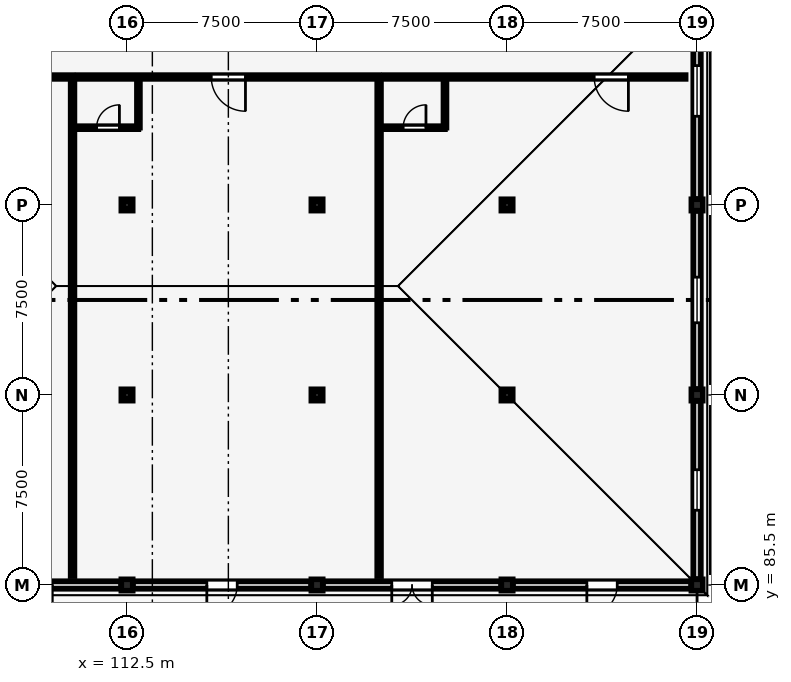
"""IFC4 building model, lengths in metres.
Left out: names, types, materials, properties, quantities, classifications, styles, units other than length and angle.
Written with IfcOpenShell. Run it as: python <this file> out.ifc"""

import sys

from ifc_helpers import new_model, si_unit, direction, frame, frame_2d, origin, origin_2d, place, context, subcontext, project, spatial, rectangle, i_section, extrude, element, fill, save


model = new_model("IFC4")
c1 = context("Model", 3, precision=1e-05, world=origin(), true_north=direction((0.0, 1.0)))
c2 = subcontext(c1, "Body", "Model", "MODEL_VIEW")
j1 = project(units=[si_unit("LENGTHUNIT", "METRE"), si_unit("PLANEANGLEUNIT", "RADIAN")], contexts=[c1])
p1 = place(None, origin())
s1 = spatial("IfcSite", under=j1, at=p1, CompositionType="ELEMENT")
p2 = place(p1, origin())
s2 = spatial("IfcBuilding", under=s1, at=p2, CompositionType="ELEMENT")
p3 = place(p2, frame((0.0, 0.0, 17.85)))
s3 = spatial("IfcBuildingStorey", under=s2, at=p3, CompositionType="ELEMENT", Elevation=17.85)
for number, where, z_axis, x_axis in (
    (1, (112.5, 85.5, 0.0), (0.0, 0.0, 1.0), (1.0, 0.0, 0.0)),
    (2, (112.5, 93.0, 0.0), (0.0, 0.0, 1.0), (1.0, 0.0, 0.0)),
    (3, (112.5, 100.5, 0.0), (0.0, 0.0, 1.0), (1.0, 0.0, 0.0)),
    (4, (120.0, 85.5, 0.0), (0.0, 0.0, 1.0), (1.0, 0.0, 0.0)),
    (5, (120.0, 93.0, 0.0), (0.0, 0.0, 1.0), (1.0, 0.0, 0.0)),
    (6, (120.0, 100.5, 0.0), (0.0, 0.0, 1.0), (1.0, 0.0, 0.0)),
    (7, (127.5, 85.5, 0.0), (0.0, 0.0, 1.0), (1.0, 0.0, 0.0)),
    (8, (127.5, 93.0, 0.0), (0.0, 0.0, 1.0), (1.0, 0.0, 0.0)),
    (9, (127.5, 100.5, 0.0), (0.0, 0.0, 1.0), (1.0, 0.0, 0.0)),
    (10, (135.0, 85.5, 0.0), (0.0, 0.0, 1.0), (1.0, 0.0, 0.0)),
    (11, (135.0, 93.0, 0.0), (0.0, 0.0, 1.0), (1.0, 0.0, 0.0)),
    (12, (135.0, 100.5, 0.0), (0.0, 0.0, 1.0), (1.0, 0.0, 0.0)),
):
    element("IfcColumn", number, at=place(p3, frame(where, z_axis=z_axis, x_axis=x_axis)), inside=s3, PredefinedType="COLUMN", context=c2, shape_type="SweptSolid", body=[
        extrude(rectangle(XDim=0.45, YDim=0.45, at=origin_2d()), origin(), (0.0, 0.0, 1.0), 4.05),
    ])
p4 = place(p3, frame((112.5, 93.0, 4.05), z_axis=(0.0, 0.0, 1.0), x_axis=(1.0, 0.0, 0.0)))
e13 = element("IfcColumn", 13, at=p4, inside=s3, PredefinedType="COLUMN", context=c2, shape_type="SweptSolid", body=[
    extrude(i_section(OverallWidth=0.3, OverallDepth=0.3, WebThickness=0.011, FlangeThickness=0.019, FilletRadius=0.027, at=origin_2d()), origin(), (0.0, 0.0, 1.0), 1.97),
])
p5 = place(p3, frame((112.5, 100.5, 4.05), z_axis=(0.0, 0.0, 1.0), x_axis=(1.0, 0.0, 0.0)))
e14 = element("IfcColumn", 14, at=p5, inside=s3, PredefinedType="COLUMN", context=c2, shape_type="SweptSolid", body=[
    extrude(i_section(OverallWidth=0.3, OverallDepth=0.3, WebThickness=0.011, FlangeThickness=0.019, FilletRadius=0.027, at=origin_2d()), origin(), (0.0, 0.0, 1.0), 2.24),
])
p6 = place(p3, frame((120.0, 93.0, 4.05), z_axis=(0.0, 0.0, 1.0), x_axis=(1.0, 0.0, 0.0)))
e15 = element("IfcColumn", 15, at=p6, inside=s3, PredefinedType="COLUMN", context=c2, shape_type="SweptSolid", body=[
    extrude(i_section(OverallWidth=0.3, OverallDepth=0.3, WebThickness=0.011, FlangeThickness=0.019, FilletRadius=0.027, at=origin_2d()), origin(), (0.0, 0.0, 1.0), 1.97),
])
p7 = place(p3, frame((120.0, 100.5, 4.05), z_axis=(0.0, 0.0, 1.0), x_axis=(1.0, 0.0, 0.0)))
e16 = element("IfcColumn", 16, at=p7, inside=s3, PredefinedType="COLUMN", context=c2, shape_type="SweptSolid", body=[
    extrude(i_section(OverallWidth=0.3, OverallDepth=0.3, WebThickness=0.011, FlangeThickness=0.019, FilletRadius=0.027, at=origin_2d()), origin(), (0.0, 0.0, 1.0), 2.24),
])
for number, where, z_axis, x_axis in (
    (17, (127.5, 93.0, 4.05), (0.0, 0.0, 1.0), (1.0, 0.0, 0.0)),
    (18, (127.5, 100.5, 4.05), (0.0, 0.0, 1.0), (1.0, 0.0, 0.0)),
):
    element("IfcColumn", number, at=place(p3, frame(where, z_axis=z_axis, x_axis=x_axis)), inside=s3, PredefinedType="COLUMN", context=c2, shape_type="SweptSolid", body=[
        extrude(i_section(OverallWidth=0.3, OverallDepth=0.3, WebThickness=0.011, FlangeThickness=0.019, FilletRadius=0.027, at=origin_2d()), origin(), (0.0, 0.0, 1.0), 1.97),
    ])
p8 = place(p3, frame((112.265, 85.5, 0.0), z_axis=(0.0, 0.0, 1.0), x_axis=(-1.0, 0.0, 0.0)))
e19 = element("IfcWall", 19, at=p8, inside=s3, PredefinedType="STANDARD", context=c2, shape_type="SweptSolid", body=[
    extrude(rectangle(XDim=7.03, YDim=0.3, at=frame_2d((3.515, 0.0))), origin(), (0.0, 0.0, 1.0), 3.77),
])
p9 = place(p8, frame((2.715, 0.0, 0.0)))
e20 = element("IfcOpeningElement", 20, at=p9, cuts=e19, PredefinedType="OPENING", context=c2, shape_type="SweptSolid", body=[
    extrude(rectangle(XDim=1.6, YDim=2.35, at=frame_2d((0.8, 1.175))), frame((0.0, 0.16, 0.0), z_axis=(0.0, -1.0, 0.0), x_axis=(1.0, 0.0, 0.0)), (0.0, 0.0, 1.0), 0.32),
])
p10 = place(p3, frame((119.765, 85.5, 0.0), z_axis=(0.0, 0.0, 1.0), x_axis=(-1.0, 0.0, 0.0)))
e21 = element("IfcWall", 21, at=p10, inside=s3, PredefinedType="STANDARD", context=c2, shape_type="SweptSolid", body=[
    extrude(rectangle(XDim=7.03, YDim=0.3, at=frame_2d((3.515, 0.0))), origin(), (0.0, 0.0, 1.0), 3.77),
])
p11 = place(p10, frame((2.915, 0.0, 0.0)))
e22 = element("IfcOpeningElement", 22, at=p11, cuts=e21, PredefinedType="OPENING", context=c2, shape_type="SweptSolid", body=[
    extrude(rectangle(XDim=1.2, YDim=2.3, at=frame_2d((0.6, 1.15))), frame((0.0, 0.16, 0.0), z_axis=(0.0, -1.0, 0.0), x_axis=(1.0, 0.0, 0.0)), (0.0, 0.0, 1.0), 0.32),
])
p12 = place(p3, frame((127.265, 85.5, 0.0), z_axis=(0.0, 0.0, 1.0), x_axis=(-1.0, 0.0, 0.0)))
e23 = element("IfcWall", 23, at=p12, inside=s3, PredefinedType="STANDARD", context=c2, shape_type="SweptSolid", body=[
    extrude(rectangle(XDim=7.03, YDim=0.3, at=frame_2d((3.515, 0.0))), origin(), (0.0, 0.0, 1.0), 3.77),
])
p13 = place(p12, frame((2.715, 0.0, 0.0)))
e24 = element("IfcOpeningElement", 24, at=p13, cuts=e23, PredefinedType="OPENING", context=c2, shape_type="SweptSolid", body=[
    extrude(rectangle(XDim=1.6, YDim=2.35, at=frame_2d((0.8, 1.175))), frame((0.0, 0.16, 0.0), z_axis=(0.0, -1.0, 0.0), x_axis=(1.0, 0.0, 0.0)), (0.0, 0.0, 1.0), 0.32),
])
p14 = place(p3, frame((134.765, 85.5, 0.0), z_axis=(0.0, 0.0, 1.0), x_axis=(-1.0, 0.0, 0.0)))
e25 = element("IfcWall", 25, at=p14, inside=s3, PredefinedType="STANDARD", context=c2, shape_type="SweptSolid", body=[
    extrude(rectangle(XDim=7.03, YDim=0.3, at=frame_2d((3.515, 0.0))), origin(), (0.0, 0.0, 1.0), 3.77),
])
p15 = place(p14, frame((2.915, 0.0, 0.0)))
e26 = element("IfcOpeningElement", 26, at=p15, cuts=e25, PredefinedType="OPENING", context=c2, shape_type="SweptSolid", body=[
    extrude(rectangle(XDim=1.2, YDim=2.3, at=frame_2d((0.6, 1.15))), frame((0.0, 0.16, 0.0), z_axis=(0.0, -1.0, 0.0), x_axis=(1.0, 0.0, 0.0)), (0.0, 0.0, 1.0), 0.32),
])
p16 = place(p3, frame((135.0, 92.765, 0.0), z_axis=(0.0, 0.0, 1.0), x_axis=(0.0, -1.0, 0.0)))
e27 = element("IfcWall", 27, at=p16, inside=s3, PredefinedType="STANDARD", context=c2, shape_type="SweptSolid", body=[
    extrude(rectangle(XDim=7.03, YDim=0.3, at=frame_2d((3.515, 0.0))), origin(), (0.0, 0.0, 1.0), 3.77),
])
p17 = place(p16, frame((2.715, 0.0, 0.9)))
e28 = element("IfcOpeningElement", 28, at=p17, cuts=e27, PredefinedType="OPENING", context=c2, shape_type="SweptSolid", body=[
    extrude(rectangle(XDim=1.6, YDim=1.95, at=frame_2d((0.8, 0.975))), frame((0.0, 0.16, 0.0), z_axis=(0.0, -1.0, 0.0), x_axis=(1.0, 0.0, 0.0)), (0.0, 0.0, 1.0), 0.32),
])
p18 = place(p3, frame((135.0, 100.265, 0.0), z_axis=(0.0, 0.0, 1.0), x_axis=(0.0, -1.0, 0.0)))
e29 = element("IfcWall", 29, at=p18, inside=s3, PredefinedType="STANDARD", context=c2, shape_type="SweptSolid", body=[
    extrude(rectangle(XDim=7.03, YDim=0.3, at=frame_2d((3.515, 0.0))), origin(), (0.0, 0.0, 1.0), 3.77),
])
p19 = place(p18, frame((2.615, 0.0, 0.9)))
e30 = element("IfcOpeningElement", 30, at=p19, cuts=e29, PredefinedType="OPENING", context=c2, shape_type="SweptSolid", body=[
    extrude(rectangle(XDim=1.8, YDim=1.95, at=frame_2d((0.9, 0.975))), frame((0.0, 0.16, 0.0), z_axis=(0.0, -1.0, 0.0), x_axis=(1.0, 0.0, 0.0)), (0.0, 0.0, 1.0), 0.32),
])
p20 = place(p3, frame((135.0, 109.265, 0.0), z_axis=(0.0, 0.0, 1.0), x_axis=(0.0, -1.0, 0.0)))
e31 = element("IfcWall", 31, at=p20, inside=s3, PredefinedType="STANDARD", context=c2, shape_type="SweptSolid", body=[
    extrude(rectangle(XDim=8.53, YDim=0.3, at=frame_2d((4.265, 0.0))), origin(), (0.0, 0.0, 1.0), 3.77),
])
p21 = place(p20, frame((3.265, 0.0, 0.9)))
e32 = element("IfcOpeningElement", 32, at=p21, cuts=e31, PredefinedType="OPENING", context=c2, shape_type="SweptSolid", body=[
    extrude(rectangle(XDim=2.0, YDim=1.95, at=frame_2d((1.0, 0.975))), frame((0.0, 0.16, 0.0), z_axis=(0.0, -1.0, 0.0), x_axis=(1.0, 0.0, 0.0)), (0.0, 0.0, 1.0), 0.32),
])
p22 = place(p3, frame((110.35, 105.55, 0.0), z_axis=(0.0, 0.0, 1.0), x_axis=(-1.0, 0.0, 0.0)))
e33 = element("IfcWall", 33, at=p22, inside=s3, PredefinedType="PARTITIONING", context=c2, shape_type="SweptSolid", body=[
    extrude(rectangle(XDim=11.9, YDim=0.15, at=frame_2d((5.95, 0.0))), origin(), (0.0, 0.0, 1.0), 3.755),
])
p23 = place(p22, frame((1.255, 0.0, 0.0)))
e34 = element("IfcOpeningElement", 34, at=p23, cuts=e33, PredefinedType="OPENING", context=c2, shape_type="SweptSolid", body=[
    extrude(rectangle(XDim=1.35, YDim=2.25, at=frame_2d((0.675, 1.125))), frame((0.0, 0.085, 0.0), z_axis=(0.0, -1.0, 0.0), x_axis=(1.0, 0.0, 0.0)), (0.0, 0.0, 1.0), 0.17),
])
p24 = place(p3, frame((122.45, 105.55, 0.0), z_axis=(0.0, 0.0, 1.0), x_axis=(-1.0, 0.0, 0.0)))
e35 = element("IfcWall", 35, at=p24, inside=s3, PredefinedType="PARTITIONING", context=c2, shape_type="SweptSolid", body=[
    extrude(rectangle(XDim=11.9, YDim=0.15, at=frame_2d((5.95, 0.0))), origin(), (0.0, 0.0, 1.0), 3.755),
])
p25 = place(p24, frame((5.275, 0.0, 0.0)))
e36 = element("IfcOpeningElement", 36, at=p25, cuts=e35, PredefinedType="OPENING", context=c2, shape_type="SweptSolid", body=[
    extrude(rectangle(XDim=1.35, YDim=2.25, at=frame_2d((0.675, 1.125))), frame((0.0, 0.085, 0.0), z_axis=(0.0, -1.0, 0.0), x_axis=(1.0, 0.0, 0.0)), (0.0, 0.0, 1.0), 0.17),
])
p26 = place(p3, frame((110.55, 103.55, 0.0), z_axis=(0.0, 0.0, 1.0), x_axis=(1.0, 0.0, 0.0)))
e37 = element("IfcWall", 37, at=p26, inside=s3, PredefinedType="PARTITIONING", context=c2, shape_type="SweptSolid", body=[
    extrude(rectangle(XDim=2.4, YDim=0.12, at=frame_2d((1.2, 0.0))), origin(), (0.0, 0.0, 1.0), 3.755),
])
p27 = place(p26, frame((0.75, 0.0, 0.0)))
e38 = element("IfcOpeningElement", 38, at=p27, cuts=e37, PredefinedType="OPENING", context=c2, shape_type="SweptSolid", body=[
    extrude(rectangle(XDim=0.9, YDim=2.1, at=frame_2d((0.45, 1.05))), frame((0.0, 0.07, 0.0), z_axis=(0.0, -1.0, 0.0), x_axis=(1.0, 0.0, 0.0)), (0.0, 0.0, 1.0), 0.14),
])
p28 = place(p3, frame((112.95, 103.55, 0.0), z_axis=(0.0, 0.0, 1.0), x_axis=(0.0, 1.0, 0.0)))
e39 = element("IfcWall", 39, at=p28, inside=s3, PredefinedType="PARTITIONING", context=c2, shape_type="SweptSolid", body=[
    extrude(rectangle(XDim=2.0, YDim=0.12, at=frame_2d((1.0, 0.0))), origin(), (0.0, 0.0, 1.0), 3.755),
])
p29 = place(p3, frame((134.55, 105.55, 0.0), z_axis=(0.0, 0.0, 1.0), x_axis=(-1.0, 0.0, 0.0)))
e40 = element("IfcWall", 40, at=p29, inside=s3, PredefinedType="PARTITIONING", context=c2, shape_type="SweptSolid", body=[
    extrude(rectangle(XDim=11.9, YDim=0.15, at=frame_2d((5.95, 0.0))), origin(), (0.0, 0.0, 1.0), 3.755),
])
p30 = place(p29, frame((2.26, 0.0, 0.0)))
e41 = element("IfcOpeningElement", 41, at=p30, cuts=e40, PredefinedType="OPENING", context=c2, shape_type="SweptSolid", body=[
    extrude(rectangle(XDim=1.35, YDim=2.25, at=frame_2d((0.675, 1.125))), frame((0.0, 0.085, 0.0), z_axis=(0.0, -1.0, 0.0), x_axis=(1.0, 0.0, 0.0)), (0.0, 0.0, 1.0), 0.17),
])
p31 = place(p3, frame((122.65, 103.55, 0.0), z_axis=(0.0, 0.0, 1.0), x_axis=(1.0, 0.0, 0.0)))
e42 = element("IfcWall", 42, at=p31, inside=s3, PredefinedType="PARTITIONING", context=c2, shape_type="SweptSolid", body=[
    extrude(rectangle(XDim=2.4, YDim=0.12, at=frame_2d((1.2, 0.0))), origin(), (0.0, 0.0, 1.0), 3.755),
])
p32 = place(p31, frame((0.75, 0.0, 0.0)))
e43 = element("IfcOpeningElement", 43, at=p32, cuts=e42, PredefinedType="OPENING", context=c2, shape_type="SweptSolid", body=[
    extrude(rectangle(XDim=0.9, YDim=2.1, at=frame_2d((0.45, 1.05))), frame((0.0, 0.07, 0.0), z_axis=(0.0, -1.0, 0.0), x_axis=(1.0, 0.0, 0.0)), (0.0, 0.0, 1.0), 0.14),
])
p33 = place(p3, frame((125.05, 103.55, 0.0), z_axis=(0.0, 0.0, 1.0), x_axis=(0.0, 1.0, 0.0)))
e44 = element("IfcWall", 44, at=p33, inside=s3, PredefinedType="PARTITIONING", context=c2, shape_type="SweptSolid", body=[
    extrude(rectangle(XDim=2.0, YDim=0.12, at=frame_2d((1.0, 0.0))), origin(), (0.0, 0.0, 1.0), 3.755),
])
for number, where, z_axis, x_axis in (
    (45, (110.35, 85.85, 0.0), (0.0, 0.0, 1.0), (0.0, 1.0, 0.0)),
    (46, (122.45, 85.85, 0.0), (0.0, 0.0, 1.0), (0.0, 1.0, 0.0)),
):
    element("IfcWall", number, at=place(p3, frame(where, z_axis=z_axis, x_axis=x_axis)), inside=s3, PredefinedType="PARTITIONING", context=c2, shape_type="SweptSolid", body=[
        extrude(rectangle(XDim=19.7, YDim=0.15, at=frame_2d((9.85, 0.0))), origin(), (0.0, 0.0, 1.0), 3.755),
    ])
p34 = place(p11, origin())
e47 = element("IfcDoor", 47, at=p34, inside=s3, OperationType="SINGLE_SWING_RIGHT", PredefinedType="DOOR", context=c2, shape_type="SweptSolid", body=[
    extrude(rectangle(XDim=1.2, YDim=2.3, at=frame_2d((0.6, 1.15))), frame((0.0, 0.025, 0.0), z_axis=(0.0, -1.0, 0.0), x_axis=(1.0, 0.0, 0.0)), (0.0, 0.0, 1.0), 0.05),
])
fill(e22, e47)
p35 = place(p13, origin())
e48 = element("IfcDoor", 48, at=p35, inside=s3, OperationType="DOUBLE_DOOR_SINGLE_SWING", PredefinedType="DOOR", context=c2, shape_type="SweptSolid", body=[
    extrude(rectangle(XDim=1.6, YDim=2.35, at=frame_2d((0.8, 1.175))), frame((0.0, 0.025, 0.0), z_axis=(0.0, -1.0, 0.0), x_axis=(1.0, 0.0, 0.0)), (0.0, 0.0, 1.0), 0.05),
])
fill(e24, e48)
p36 = place(p15, origin())
e49 = element("IfcDoor", 49, at=p36, inside=s3, OperationType="SINGLE_SWING_RIGHT", PredefinedType="DOOR", context=c2, shape_type="SweptSolid", body=[
    extrude(rectangle(XDim=1.2, YDim=2.3, at=frame_2d((0.6, 1.15))), frame((0.0, 0.025, 0.0), z_axis=(0.0, -1.0, 0.0), x_axis=(1.0, 0.0, 0.0)), (0.0, 0.0, 1.0), 0.05),
])
fill(e26, e49)
p37 = place(p17, origin())
e50 = element("IfcWindow", 50, at=p37, inside=s3, PartitioningType="SINGLE_PANEL", PredefinedType="WINDOW", context=c2, shape_type="SweptSolid", body=[
    extrude(rectangle(XDim=1.6, YDim=1.95, at=frame_2d((0.8, 0.975))), frame((0.0, 0.03, 0.0), z_axis=(0.0, -1.0, 0.0), x_axis=(1.0, 0.0, 0.0)), (0.0, 0.0, 1.0), 0.06),
])
fill(e28, e50)
p38 = place(p19, origin())
e51 = element("IfcWindow", 51, at=p38, inside=s3, PartitioningType="SINGLE_PANEL", PredefinedType="WINDOW", context=c2, shape_type="SweptSolid", body=[
    extrude(rectangle(XDim=1.8, YDim=1.95, at=frame_2d((0.9, 0.975))), frame((0.0, 0.03, 0.0), z_axis=(0.0, -1.0, 0.0), x_axis=(1.0, 0.0, 0.0)), (0.0, 0.0, 1.0), 0.06),
])
fill(e30, e51)
p39 = place(p21, origin())
e52 = element("IfcWindow", 52, at=p39, inside=s3, PartitioningType="SINGLE_PANEL", PredefinedType="WINDOW", context=c2, shape_type="SweptSolid", body=[
    extrude(rectangle(XDim=2.0, YDim=1.95, at=frame_2d((1.0, 0.975))), frame((0.0, 0.03, 0.0), z_axis=(0.0, -1.0, 0.0), x_axis=(1.0, 0.0, 0.0)), (0.0, 0.0, 1.0), 0.06),
])
fill(e32, e52)
p40 = place(p25, origin())
e53 = element("IfcDoor", 53, at=p40, inside=s3, OperationType="SINGLE_SWING_LEFT", PredefinedType="DOOR", context=c2, shape_type="SweptSolid", body=[
    extrude(rectangle(XDim=1.35, YDim=2.25, at=frame_2d((0.675, 1.125))), frame((0.0, 0.025, 0.0), z_axis=(0.0, -1.0, 0.0), x_axis=(1.0, 0.0, 0.0)), (0.0, 0.0, 1.0), 0.05),
])
fill(e36, e53)
p41 = place(p27, origin())
e54 = element("IfcDoor", 54, at=p41, inside=s3, OperationType="SINGLE_SWING_RIGHT", PredefinedType="DOOR", context=c2, shape_type="SweptSolid", body=[
    extrude(rectangle(XDim=0.9, YDim=2.1, at=frame_2d((0.45, 1.05))), frame((0.0, 0.025, 0.0), z_axis=(0.0, -1.0, 0.0), x_axis=(1.0, 0.0, 0.0)), (0.0, 0.0, 1.0), 0.05),
])
fill(e38, e54)
p42 = place(p30, origin())
e55 = element("IfcDoor", 55, at=p42, inside=s3, OperationType="SINGLE_SWING_LEFT", PredefinedType="DOOR", context=c2, shape_type="SweptSolid", body=[
    extrude(rectangle(XDim=1.35, YDim=2.25, at=frame_2d((0.675, 1.125))), frame((0.0, 0.025, 0.0), z_axis=(0.0, -1.0, 0.0), x_axis=(1.0, 0.0, 0.0)), (0.0, 0.0, 1.0), 0.05),
])
fill(e41, e55)
p43 = place(p32, origin())
e56 = element("IfcDoor", 56, at=p43, inside=s3, OperationType="SINGLE_SWING_RIGHT", PredefinedType="DOOR", context=c2, shape_type="SweptSolid", body=[
    extrude(rectangle(XDim=0.9, YDim=2.1, at=frame_2d((0.45, 1.05))), frame((0.0, 0.025, 0.0), z_axis=(0.0, -1.0, 0.0), x_axis=(1.0, 0.0, 0.0)), (0.0, 0.0, 1.0), 0.05),
])
fill(e43, e56)
save(model, sys.argv[1])
